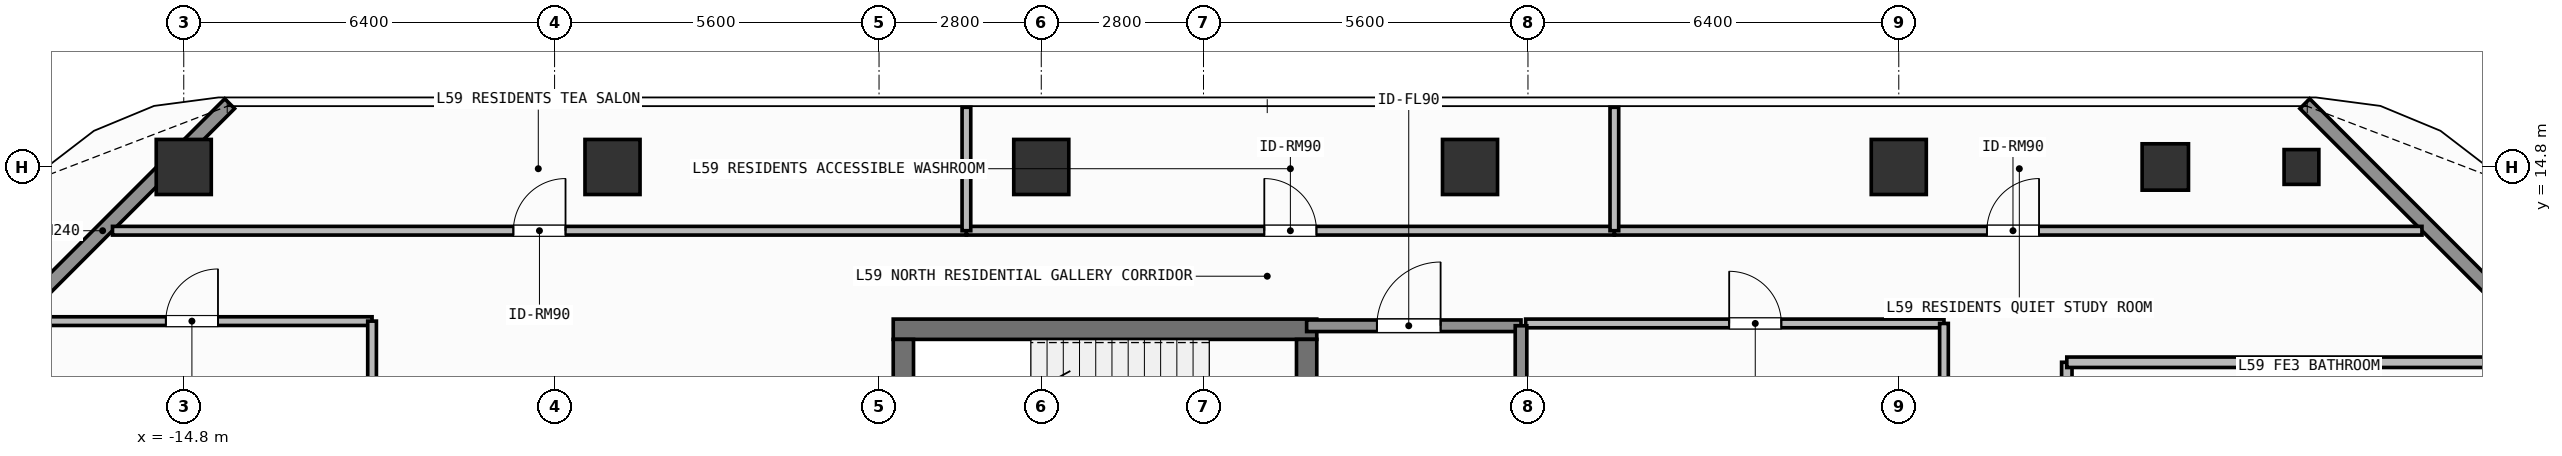
"""IFC4 building model, lengths in metres.
Left out: names, types, materials, properties, quantities, classifications, styles, units other than length and angle.
Written with IfcOpenShell. Run it as: python <this file> out.ifc"""

import sys

from ifc_helpers import new_model, si_unit, direction, frame, frame_2d, origin, origin_2d, place, context, subcontext, project, spatial, rectangle, hollow_rectangle, extrude, element, fill, save


model = new_model("IFC4")
c1 = context("Model", 3, precision=1e-05, world=origin(), true_north=direction((0.0, 1.0)))
c2 = subcontext(c1, "Body", "Model", "MODEL_VIEW")
j1 = project(units=[si_unit("LENGTHUNIT", "METRE"), si_unit("PLANEANGLEUNIT", "RADIAN")], contexts=[c1])
p1 = place(None, origin())
s1 = spatial("IfcSite", under=j1, at=p1, CompositionType="ELEMENT")
p2 = place(p1, origin())
s2 = spatial("IfcBuilding", under=s1, at=p2, CompositionType="ELEMENT")
p3 = place(p2, frame((0.0, 0.0, 243.0)))
s3 = spatial("IfcBuildingStorey", under=s2, at=p3, CompositionType="ELEMENT", Elevation=243.0)
p4 = place(p3, frame((-2.555, 12.0, 0.0), z_axis=(0.0, 0.0, 1.0), x_axis=(1.0, 0.0, 0.0)))
e1 = element("IfcWall", 1, at=p4, inside=s3, PredefinedType="SHEAR", context=c2, shape_type="SweptSolid", body=[
    extrude(rectangle(XDim=7.31, YDim=0.35, at=frame_2d((3.655, 0.0))), origin(), (0.0, 0.0, 1.0), 3.9),
])
p5 = place(p3, frame((-2.38, 8.9, 0.0), z_axis=(0.0, 0.0, 1.0), x_axis=(0.0, 1.0, 0.0)))
e2 = element("IfcWall", 2, at=p5, inside=s3, PredefinedType="SHEAR", context=c2, shape_type="SweptSolid", body=[
    extrude(rectangle(XDim=2.925, YDim=0.35, at=frame_2d((1.462, 0.0))), origin(), (0.0, 0.0, 1.0), 3.9),
])
p6 = place(p3, frame((4.58, 11.825, 0.0), z_axis=(0.0, 0.0, 1.0), x_axis=(0.0, -1.0, 0.0)))
e3 = element("IfcWall", 3, at=p6, inside=s3, PredefinedType="SHEAR", context=c2, shape_type="SweptSolid", body=[
    extrude(rectangle(XDim=2.925, YDim=0.35, at=frame_2d((1.462, 0.0))), origin(), (0.0, 0.0, 1.0), 3.9),
])
p7 = place(p6, frame((0.913, 0.0, 0.0)))
e4 = element("IfcOpeningElement", 4, at=p7, cuts=e3, PredefinedType="OPENING", context=c2, shape_type="SweptSolid", body=[
    extrude(rectangle(XDim=1.1, YDim=2.15, at=frame_2d((0.55, 1.075))), frame((0.0, 0.185, 0.0), z_axis=(0.0, -1.0, 0.0), x_axis=(1.0, 0.0, 0.0)), (0.0, 0.0, 1.0), 0.37),
])
for number, where, z_axis, x_axis in (
    (5, (-14.8, 14.8, 0.0), (0.0, 0.0, 1.0), (1.0, 0.0, 0.0)),
    (6, (-7.4, 14.8, 0.0), (0.0, 0.0, 1.0), (1.0, 0.0, 0.0)),
    (7, (0.0, 14.8, 0.0), (0.0, 0.0, 1.0), (1.0, 0.0, 0.0)),
    (8, (7.4, 14.8, 0.0), (0.0, 0.0, 1.0), (1.0, 0.0, 0.0)),
    (9, (14.8, 14.8, 0.0), (0.0, 0.0, 1.0), (1.0, 0.0, 0.0)),
):
    element("IfcColumn", number, at=place(p3, frame(where, z_axis=z_axis, x_axis=x_axis)), inside=s3, PredefinedType="COLUMN", context=c2, shape_type="SweptSolid", body=[
        extrude(rectangle(XDim=0.95, YDim=0.95, at=origin_2d()), origin(), (0.0, 0.0, 1.0), 3.9),
    ])
p8 = place(p3, frame((19.4, 14.8, 0.0), z_axis=(0.0, 0.0, 1.0), x_axis=(1.0, 0.0, 0.0)))
e10 = element("IfcColumn", 10, at=p8, inside=s3, PredefinedType="COLUMN", context=c2, shape_type="SweptSolid", body=[
    extrude(hollow_rectangle(XDim=0.8, YDim=0.8, WallThickness=0.036, at=origin_2d()), origin(), (0.0, 0.0, 1.0), 3.9),
])
p9 = place(p3, frame((21.75, 14.8, 0.0), z_axis=(0.0, 0.0, 1.0), x_axis=(1.0, 0.0, 0.0)))
e11 = element("IfcColumn", 11, at=p9, inside=s3, PredefinedType="COLUMN", context=c2, shape_type="SweptSolid", body=[
    extrude(hollow_rectangle(XDim=0.6, YDim=0.6, WallThickness=0.028, at=origin_2d()), origin(), (0.0, 0.0, 1.0), 3.9),
])
for number, where, z_axis, x_axis in (
    (12, (-18.392, 11.508, 0.0), (0.0, 0.0, 1.0), (0.707, 0.707, 0.0)),
    (13, (21.808, 15.892, 0.0), (0.0, 0.0, 1.0), (0.707, -0.707, 0.0)),
):
    element("IfcWall", number, at=place(p3, frame(where, z_axis=z_axis, x_axis=x_axis)), inside=s3, PredefinedType="SOLIDWALL", context=c2, shape_type="SweptSolid", body=[
        extrude(rectangle(XDim=6.201, YDim=0.24, at=frame_2d((3.101, 0.0))), origin(), (0.0, 0.0, 1.0), 3.68),
    ])
p10 = place(p3, frame((4.58, 12.06, 0.0), z_axis=(0.0, 0.0, 1.0), x_axis=(1.0, 0.0, 0.0)))
e14 = element("IfcWall", 14, at=p10, inside=s3, PredefinedType="SOLIDWALL", context=c2, shape_type="SweptSolid", body=[
    extrude(rectangle(XDim=3.7, YDim=0.2, at=frame_2d((1.85, 0.0))), origin(), (0.0, 0.0, 1.0), 3.68),
])
p11 = place(p10, frame((1.212, 0.0, 0.0)))
e15 = element("IfcOpeningElement", 15, at=p11, cuts=e14, PredefinedType="OPENING", context=c2, shape_type="SweptSolid", body=[
    extrude(rectangle(XDim=1.1, YDim=2.15, at=frame_2d((0.55, 1.075))), frame((0.0, 0.11, 0.0), z_axis=(0.0, -1.0, 0.0), x_axis=(1.0, 0.0, 0.0)), (0.0, 0.0, 1.0), 0.22),
])
p12 = place(p3, frame((8.36, 12.1, 0.0), z_axis=(0.0, 0.0, 1.0), x_axis=(1.0, 0.0, 0.0)))
e16 = element("IfcWall", 16, at=p12, inside=s3, PredefinedType="PARTITIONING", context=c2, shape_type="SweptSolid", body=[
    extrude(rectangle(XDim=7.22, YDim=0.15, at=frame_2d((3.61, 0.0))), origin(), (0.0, 0.0, 1.0), 3.68),
])
p13 = place(p12, frame((3.513, 0.0, 0.0)))
e17 = element("IfcOpeningElement", 17, at=p13, cuts=e16, PredefinedType="OPENING", context=c2, shape_type="SweptSolid", body=[
    extrude(rectangle(XDim=0.9, YDim=2.1, at=frame_2d((0.45, 1.05))), frame((0.0, 0.085, 0.0), z_axis=(0.0, -1.0, 0.0), x_axis=(1.0, 0.0, 0.0)), (0.0, 0.0, 1.0), 0.17),
])
p14 = place(p3, frame((-16.03, 13.7, 0.0), z_axis=(0.0, 0.0, 1.0), x_axis=(1.0, 0.0, 0.0)))
e18 = element("IfcWall", 18, at=p14, inside=s3, PredefinedType="PARTITIONING", context=c2, shape_type="SweptSolid", body=[
    extrude(rectangle(XDim=14.738, YDim=0.15, at=frame_2d((7.369, 0.0))), origin(), (0.0, 0.0, 1.0), 3.68),
])
p15 = place(p14, frame((6.919, 0.0, 0.0)))
e19 = element("IfcOpeningElement", 19, at=p15, cuts=e18, PredefinedType="OPENING", context=c2, shape_type="SweptSolid", body=[
    extrude(rectangle(XDim=0.9, YDim=2.1, at=frame_2d((0.45, 1.05))), frame((0.0, 0.085, 0.0), z_axis=(0.0, -1.0, 0.0), x_axis=(1.0, 0.0, 0.0)), (0.0, 0.0, 1.0), 0.17),
])
p16 = place(p3, frame((-1.292, 13.7, 0.0), z_axis=(0.0, 0.0, 1.0), x_axis=(1.0, 0.0, 0.0)))
e20 = element("IfcWall", 20, at=p16, inside=s3, PredefinedType="PARTITIONING", context=c2, shape_type="SweptSolid", body=[
    extrude(rectangle(XDim=11.183, YDim=0.15, at=frame_2d((5.592, 0.0))), origin(), (0.0, 0.0, 1.0), 3.68),
])
p17 = place(p16, frame((5.142, 0.0, 0.0)))
e21 = element("IfcOpeningElement", 21, at=p17, cuts=e20, PredefinedType="OPENING", context=c2, shape_type="SweptSolid", body=[
    extrude(rectangle(XDim=0.9, YDim=2.1, at=frame_2d((0.45, 1.05))), frame((0.0, 0.085, 0.0), z_axis=(0.0, -1.0, 0.0), x_axis=(1.0, 0.0, 0.0)), (0.0, 0.0, 1.0), 0.17),
])
p18 = place(p3, frame((9.891, 13.7, 0.0), z_axis=(0.0, 0.0, 1.0), x_axis=(1.0, 0.0, 0.0)))
e22 = element("IfcWall", 22, at=p18, inside=s3, PredefinedType="PARTITIONING", context=c2, shape_type="SweptSolid", body=[
    extrude(rectangle(XDim=13.939, YDim=0.15, at=frame_2d((6.969, 0.0))), origin(), (0.0, 0.0, 1.0), 3.68),
])
p19 = place(p18, frame((6.43, 0.0, 0.0)))
e23 = element("IfcOpeningElement", 23, at=p19, cuts=e22, PredefinedType="OPENING", context=c2, shape_type="SweptSolid", body=[
    extrude(rectangle(XDim=0.9, YDim=2.1, at=frame_2d((0.45, 1.05))), frame((0.0, 0.085, 0.0), z_axis=(0.0, -1.0, 0.0), x_axis=(1.0, 0.0, 0.0)), (0.0, 0.0, 1.0), 0.17),
])
p20 = place(p3, frame((-17.59, 12.14, 0.0), z_axis=(0.0, 0.0, 1.0), x_axis=(1.0, 0.0, 0.0)))
e24 = element("IfcWall", 24, at=p20, inside=s3, PredefinedType="PARTITIONING", context=c2, shape_type="SweptSolid", body=[
    extrude(rectangle(XDim=6.04, YDim=0.15, at=frame_2d((3.02, 0.0))), origin(), (0.0, 0.0, 1.0), 3.68),
])
p21 = place(p20, frame((2.481, 0.0, 0.0)))
e25 = element("IfcOpeningElement", 25, at=p21, cuts=e24, PredefinedType="OPENING", context=c2, shape_type="SweptSolid", body=[
    extrude(rectangle(XDim=0.9, YDim=2.1, at=frame_2d((0.45, 1.05))), frame((0.0, 0.085, 0.0), z_axis=(0.0, -1.0, 0.0), x_axis=(1.0, 0.0, 0.0)), (0.0, 0.0, 1.0), 0.17),
])
p22 = place(p3, frame((17.7, 3.58, 0.0), z_axis=(0.0, 0.0, 1.0), x_axis=(0.0, 1.0, 0.0)))
e26 = element("IfcWall", 26, at=p22, inside=s3, PredefinedType="PARTITIONING", context=c2, shape_type="SweptSolid", body=[
    extrude(rectangle(XDim=7.85, YDim=0.18, at=frame_2d((3.925, 0.0))), origin(), (0.0, 0.0, 1.0), 3.68),
])
p23 = place(p22, frame((1.396, 0.0, 0.0)))
e27 = element("IfcOpeningElement", 27, at=p23, cuts=e26, PredefinedType="OPENING", context=c2, shape_type="SweptSolid", body=[
    extrude(rectangle(XDim=1.0, YDim=2.2, at=frame_2d((0.5, 1.1))), frame((0.0, 0.1, 0.0), z_axis=(0.0, -1.0, 0.0), x_axis=(1.0, 0.0, 0.0)), (0.0, 0.0, 1.0), 0.2),
])
p24 = place(p3, frame((8.28, 8.725, 0.0), z_axis=(0.0, 0.0, 1.0), x_axis=(0.0, 1.0, 0.0)))
e28 = element("IfcWall", 28, at=p24, inside=s3, PredefinedType="SOLIDWALL", context=c2, shape_type="SweptSolid", body=[
    extrude(rectangle(XDim=3.335, YDim=0.2, at=frame_2d((1.667, 0.0))), origin(), (0.0, 0.0, 1.0), 3.68),
])
p25 = place(p3, frame((15.58, 5.85, 0.0), z_axis=(0.0, 0.0, 1.0), x_axis=(0.0, 1.0, 0.0)))
e29 = element("IfcWall", 29, at=p25, inside=s3, PredefinedType="PARTITIONING", context=c2, shape_type="SweptSolid", body=[
    extrude(rectangle(XDim=6.25, YDim=0.15, at=frame_2d((3.125, 0.0))), origin(), (0.0, 0.0, 1.0), 3.68),
])
for number, where, z_axis, x_axis in (
    (30, (-1.292, 13.7, 0.0), (0.0, 0.0, 1.0), (0.0, 1.0, 0.0)),
    (31, (9.891, 13.7, 0.0), (0.0, 0.0, 1.0), (0.0, 1.0, 0.0)),
):
    element("IfcWall", number, at=place(p3, frame(where, z_axis=z_axis, x_axis=x_axis)), inside=s3, PredefinedType="PARTITIONING", context=c2, shape_type="SweptSolid", body=[
        extrude(rectangle(XDim=2.13, YDim=0.15, at=frame_2d((1.065, 0.0))), origin(), (0.0, 0.0, 1.0), 3.68),
    ])
p26 = place(p3, frame((-11.55, 2.95, 0.0), z_axis=(0.0, 0.0, 1.0), x_axis=(0.0, 1.0, 0.0)))
e32 = element("IfcWall", 32, at=p26, inside=s3, PredefinedType="PARTITIONING", context=c2, shape_type="SweptSolid", body=[
    extrude(rectangle(XDim=9.19, YDim=0.15, at=frame_2d((4.595, 0.0))), origin(), (0.0, 0.0, 1.0), 3.68),
])
for number, where, z_axis, x_axis in (
    (33, (21.178, 6.38, 0.0), (0.0, 0.0, 1.0), (0.0, 1.0, 0.0)),
    (34, (22.578, 6.38, 0.0), (0.0, 0.0, 1.0), (0.0, 1.0, 0.0)),
):
    element("IfcWall", number, at=place(p3, frame(where, z_axis=z_axis, x_axis=x_axis)), inside=s3, PredefinedType="PARTITIONING", context=c2, shape_type="SweptSolid", body=[
        extrude(rectangle(XDim=5.05, YDim=0.15, at=frame_2d((2.525, 0.0))), origin(), (0.0, 0.0, 1.0), 3.68),
    ])
p27 = place(p3, frame((17.7, 11.43, 0.0), z_axis=(0.0, 0.0, 1.0), x_axis=(1.0, 0.0, 0.0)))
e35 = element("IfcWall", 35, at=p27, inside=s3, PredefinedType="PARTITIONING", context=c2, shape_type="SweptSolid", body=[
    extrude(rectangle(XDim=8.43, YDim=0.18, at=frame_2d((4.215, 0.0))), origin(), (0.0, 0.0, 1.0), 3.42),
])
p28 = place(p11, origin())
e36 = element("IfcDoor", 36, at=p28, inside=s3, OperationType="SINGLE_SWING_RIGHT", PredefinedType="DOOR", context=c2, shape_type="SweptSolid", body=[
    extrude(rectangle(XDim=1.1, YDim=2.15, at=frame_2d((0.55, 1.075))), frame((0.0, 0.025, 0.0), z_axis=(0.0, -1.0, 0.0), x_axis=(1.0, 0.0, 0.0)), (0.0, 0.0, 1.0), 0.05),
])
fill(e15, e36)
p29 = place(p13, origin())
e37 = element("IfcDoor", 37, at=p29, inside=s3, OperationType="SINGLE_SWING_LEFT", PredefinedType="DOOR", context=c2, shape_type="SweptSolid", body=[
    extrude(rectangle(XDim=0.9, YDim=2.1, at=frame_2d((0.45, 1.05))), frame((0.0, 0.025, 0.0), z_axis=(0.0, -1.0, 0.0), x_axis=(1.0, 0.0, 0.0)), (0.0, 0.0, 1.0), 0.05),
])
fill(e17, e37)
p30 = place(p15, origin())
e38 = element("IfcDoor", 38, at=p30, inside=s3, OperationType="SINGLE_SWING_RIGHT", PredefinedType="DOOR", context=c2, shape_type="SweptSolid", body=[
    extrude(rectangle(XDim=0.9, YDim=2.1, at=frame_2d((0.45, 1.05))), frame((0.0, 0.025, 0.0), z_axis=(0.0, -1.0, 0.0), x_axis=(1.0, 0.0, 0.0)), (0.0, 0.0, 1.0), 0.05),
])
fill(e19, e38)
p31 = place(p17, origin())
e39 = element("IfcDoor", 39, at=p31, inside=s3, OperationType="SINGLE_SWING_LEFT", PredefinedType="DOOR", context=c2, shape_type="SweptSolid", body=[
    extrude(rectangle(XDim=0.9, YDim=2.1, at=frame_2d((0.45, 1.05))), frame((0.0, 0.025, 0.0), z_axis=(0.0, -1.0, 0.0), x_axis=(1.0, 0.0, 0.0)), (0.0, 0.0, 1.0), 0.05),
])
fill(e21, e39)
p32 = place(p19, origin())
e40 = element("IfcDoor", 40, at=p32, inside=s3, OperationType="SINGLE_SWING_RIGHT", PredefinedType="DOOR", context=c2, shape_type="SweptSolid", body=[
    extrude(rectangle(XDim=0.9, YDim=2.1, at=frame_2d((0.45, 1.05))), frame((0.0, 0.025, 0.0), z_axis=(0.0, -1.0, 0.0), x_axis=(1.0, 0.0, 0.0)), (0.0, 0.0, 1.0), 0.05),
])
fill(e23, e40)
p33 = place(p21, origin())
e41 = element("IfcDoor", 41, at=p33, inside=s3, OperationType="SINGLE_SWING_RIGHT", PredefinedType="DOOR", context=c2, shape_type="SweptSolid", body=[
    extrude(rectangle(XDim=0.9, YDim=2.1, at=frame_2d((0.45, 1.05))), frame((0.0, 0.025, 0.0), z_axis=(0.0, -1.0, 0.0), x_axis=(1.0, 0.0, 0.0)), (0.0, 0.0, 1.0), 0.05),
])
fill(e25, e41)
save(model, sys.argv[1])
